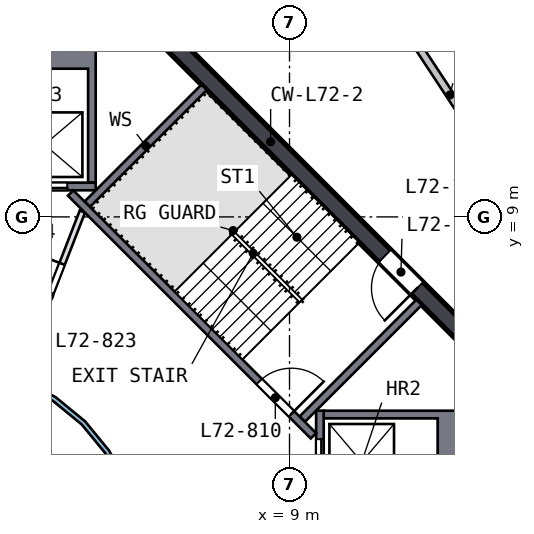
"""IFC4 building model, lengths in metres.
Left out: names, types, materials, properties, quantities, classifications, styles, units other than length and angle.
Written with IfcOpenShell. Run it as: python <this file> out.ifc"""

import sys

from ifc_helpers import new_model, si_unit, direction, frame, frame_2d, origin, place, context, subcontext, project, spatial, polyline, rectangle, outline, extrude, element, fill, save


model = new_model("IFC4")
c1 = context("Model", 3, precision=1e-05, world=origin(), true_north=direction((0.0, 1.0)))
c2 = subcontext(c1, "Body", "Model", "MODEL_VIEW")
j1 = project(units=[si_unit("LENGTHUNIT", "METRE"), si_unit("PLANEANGLEUNIT", "RADIAN")], contexts=[c1])
p1 = place(None, origin())
s1 = spatial("IfcSite", under=j1, at=p1, CompositionType="ELEMENT")
p2 = place(p1, origin())
s2 = spatial("IfcBuilding", under=s1, at=p2, CompositionType="ELEMENT")
p3 = place(p2, frame((0.0, 0.0, 291.5)))
s3 = spatial("IfcBuildingStorey", under=s2, at=p3, CompositionType="ELEMENT", Elevation=291.5)
p4 = place(p3, frame((13.841, 5.64, 0.0), z_axis=(0.0, 0.0, 1.0), x_axis=(-0.707106781, 0.707106781, 0.0)))
e1 = element("IfcWall", 1, at=p4, inside=s3, PredefinedType="SHEAR", context=c2, shape_type="SweptSolid", body=[
    extrude(rectangle(XDim=11.598, YDim=0.45, at=frame_2d((5.799, 0.0))), origin(), (0.0, 0.0, 1.0), 3.5),
])
p5 = place(p4, frame((2.099, 0.0, 0.0)))
e2 = element("IfcOpeningElement", 2, at=p5, cuts=e1, PredefinedType="OPENING", context=c2, shape_type="SweptSolid", body=[
    extrude(rectangle(XDim=1.2, YDim=2.1, at=frame_2d((0.6, 1.05))), frame((0.0, 0.235, 0.0), z_axis=(0.0, -1.0, 0.0), x_axis=(1.0, 0.0, 0.0)), (0.0, 0.0, 1.0), 0.47),
])
p6 = place(p3, origin())
e3 = element("IfcWall", 3, at=p6, inside=s3, PredefinedType="SOLIDWALL", context=c2, shape_type="SweptSolid", body=[
    extrude(outline(polyline([(13.55, 3.9), (13.55, 1.2), (9.9, 1.2), (9.9, 1.4), (12.9, 1.4), (12.9, 3.7), (9.9, 3.7), (9.9, 3.9), (13.55, 3.9)])), origin(), (0.0, 0.0, 1.0), 3.19),
])
p7 = place(p3, frame((9.8, 1.2, 0.0), z_axis=(0.0, 0.0, 1.0), x_axis=(0.0, 1.0, 0.0)))
e4 = element("IfcWall", 4, at=p7, inside=s3, PredefinedType="SOLIDWALL", context=c2, shape_type="SweptSolid", body=[
    extrude(rectangle(XDim=2.7, YDim=0.2, at=frame_2d((1.35, 0.0))), origin(), (0.0, 0.0, 1.0), 3.19),
])
p8 = place(p7, frame((0.75, 0.0, 0.0)))
e5 = element("IfcOpeningElement", 5, at=p8, cuts=e4, PredefinedType="OPENING", context=c2, shape_type="SweptSolid", body=[
    extrude(rectangle(XDim=1.2, YDim=2.1, at=frame_2d((0.6, 1.05))), frame((0.0, 0.11, 0.0), z_axis=(0.0, -1.0, 0.0), x_axis=(1.0, 0.0, 0.0)), (0.0, 0.0, 1.0), 0.22),
])
p9 = place(p3, origin())
e6 = element("IfcWall", 6, at=p9, inside=s3, PredefinedType="SOLIDWALL", context=c2, shape_type="SweptSolid", body=[
    extrude(outline(polyline([(3.9, 9.9), (3.7, 9.9), (3.7, 12.9), (1.4, 12.9), (1.4, 9.9), (1.2, 9.9), (1.2, 13.55), (3.9, 13.55), (3.9, 9.9)])), origin(), (0.0, 0.0, 1.0), 3.19),
])
p10 = place(p3, frame((1.2, 9.8, 0.0), z_axis=(0.0, 0.0, 1.0), x_axis=(1.0, 0.0, 0.0)))
e7 = element("IfcWall", 7, at=p10, inside=s3, PredefinedType="SOLIDWALL", context=c2, shape_type="SweptSolid", body=[
    extrude(rectangle(XDim=2.7, YDim=0.2, at=frame_2d((1.35, 0.0))), origin(), (0.0, 0.0, 1.0), 3.19),
])
p11 = place(p10, frame((0.75, 0.0, 0.0)))
e8 = element("IfcOpeningElement", 8, at=p11, cuts=e7, PredefinedType="OPENING", context=c2, shape_type="SweptSolid", body=[
    extrude(rectangle(XDim=1.2, YDim=2.1, at=frame_2d((0.6, 1.05))), frame((0.0, 0.11, 0.0), z_axis=(0.0, -1.0, 0.0), x_axis=(1.0, 0.0, 0.0)), (0.0, 0.0, 1.0), 0.22),
])
p12 = place(p3, frame((3.24, 9.629, 0.0), z_axis=(0.0, 0.0, 1.0), x_axis=(0.707106781, -0.707106781, 0.0)))
e9 = element("IfcWall", 9, at=p12, inside=s3, PredefinedType="SOLIDWALL", context=c2, shape_type="SweptSolid", body=[
    extrude(rectangle(XDim=9.036, YDim=0.2, at=frame_2d((4.518, 0.0))), origin(), (0.0, 0.0, 1.0), 3.19),
])
p13 = place(p12, frame((7.018, 0.0, 0.0)))
e10 = element("IfcOpeningElement", 10, at=p13, cuts=e9, PredefinedType="OPENING", context=c2, shape_type="SweptSolid", body=[
    extrude(rectangle(XDim=1.2, YDim=2.1, at=frame_2d((0.6, 1.05))), frame((0.0, 0.11, 0.0), z_axis=(0.0, -1.0, 0.0), x_axis=(1.0, 0.0, 0.0)), (0.0, 0.0, 1.0), 0.22),
])
for number, where, z_axis, x_axis in (
    (11, (9.334, 3.677, 0.0), (0.0, 0.0, 1.0), (0.707, 0.707, 0.0)),
    (12, (3.677, 9.334, 0.0), (0.0, 0.0, 1.0), (0.707, 0.707, 0.0)),
):
    element("IfcWall", number, at=place(p3, frame(where, z_axis=z_axis, x_axis=x_axis)), inside=s3, PredefinedType="SOLIDWALL", context=c2, shape_type="SweptSolid", body=[
        extrude(rectangle(XDim=4.35, YDim=0.2, at=frame_2d((2.175, 0.0))), origin(), (0.0, 0.0, 1.0), 3.19),
    ])
p14 = place(p3, frame((1.857, 4.782, 0.0), z_axis=(0.0, 0.0, 1.0), x_axis=(0.36202798, 0.932167228, 0.0)))
e13 = element("IfcWall", 13, at=p14, inside=s3, PredefinedType="PARTITIONING", context=c2, shape_type="SweptSolid", body=[
    extrude(rectangle(XDim=4.676, YDim=0.15, at=frame_2d((2.338, 0.0))), origin(), (0.0, 0.0, 1.0), 3.19),
])
p15 = place(p14, frame((1.4, 0.0, 0.0)))
e14 = element("IfcOpeningElement", 14, at=p15, cuts=e13, PredefinedType="OPENING", context=c2, shape_type="SweptSolid", body=[
    extrude(rectangle(XDim=1.8, YDim=2.1, at=frame_2d((0.9, 1.05))), frame((0.0, 0.085, 0.0), z_axis=(0.0, -1.0, 0.0), x_axis=(1.0, 0.0, 0.0)), (0.0, 0.0, 1.0), 0.17),
])
p16 = place(p3, origin())
e15 = element("IfcWall", 15, at=p16, inside=s3, PredefinedType="SOLIDWALL", context=c2, shape_type="SweptSolid", body=[
    extrude(outline(polyline([(5.021, -0.999), (4.73, -1.959), (4.257, -2.844), (3.62, -3.62), (2.844, -4.257), (1.959, -4.73), (0.999, -5.021), (0.0, -5.12), (-0.999, -5.021), (-1.959, -4.73), (-2.844, -4.257), (-3.62, -3.62), (-4.257, -2.844), (-4.73, -1.959), (-5.021, -0.999), (-5.12, 0.0), (-5.021, 0.999), (-4.73, 1.959), (-4.257, 2.844), (-3.62, 3.62), (-2.844, 4.257), (-1.959, 4.73), (-0.999, 5.021), (0.0, 5.12), (0.999, 5.021), (1.959, 4.73), (2.844, 4.257), (3.62, 3.62), (4.257, 2.844), (4.73, 1.959), (5.021, 0.999), (5.12, 0.0), (5.021, -0.999)]), holes=[polyline([(4.904, 0.976), (4.619, 1.913), (4.157, 2.778), (3.535, 3.535), (2.778, 4.157), (1.913, 4.619), (0.976, 4.904), (0.0, 5.0), (-0.976, 4.904), (-1.913, 4.619), (-2.778, 4.157), (-3.535, 3.535), (-4.157, 2.778), (-4.619, 1.913), (-4.904, 0.976), (-5.0, 0.0), (-4.904, -0.976), (-4.619, -1.913), (-4.157, -2.778), (-3.535, -3.535), (-2.778, -4.157), (-1.913, -4.619), (-0.976, -4.904), (0.0, -5.0), (0.976, -4.904), (1.913, -4.619), (2.778, -4.157), (3.535, -3.535), (4.157, -2.778), (4.619, -1.913), (4.904, -0.976), (5.0, 0.0), (4.904, 0.976)])]), origin(), (0.0, 0.0, 1.0), 3.19),
])
p17 = place(p3, frame((12.216, 13.74, 0.0), z_axis=(0.0, 0.0, 1.0), x_axis=(0.549889366, -0.835237502, 0.0)))
e16 = element("IfcWall", 16, at=p17, inside=s3, PredefinedType="SOLIDWALL", context=c2, shape_type="SweptSolid", body=[
    extrude(rectangle(XDim=9.316, YDim=0.2, at=frame_2d((4.658, 0.0))), origin(), (0.0, 0.0, 1.0), 3.19),
])
p18 = place(p17, frame((3.863, 0.0, 0.0)))
e17 = element("IfcOpeningElement", 17, at=p18, cuts=e16, PredefinedType="OPENING", context=c2, shape_type="SweptSolid", body=[
    extrude(rectangle(XDim=1.8, YDim=2.1, at=frame_2d((0.9, 1.05))), frame((0.0, 0.11, 0.0), z_axis=(0.0, -1.0, 0.0), x_axis=(1.0, 0.0, 0.0)), (0.0, 0.0, 1.0), 0.22),
])
p19 = place(p8, origin())
e18 = element("IfcDoor", 18, at=p19, inside=s3, OperationType="DOUBLE_DOOR_SLIDING", PredefinedType="DOOR", context=c2, shape_type="SweptSolid", body=[
    extrude(rectangle(XDim=1.2, YDim=2.1, at=frame_2d((0.6, 1.05))), frame((0.0, 0.025, 0.0), z_axis=(0.0, -1.0, 0.0), x_axis=(1.0, 0.0, 0.0)), (0.0, 0.0, 1.0), 0.05),
])
fill(e5, e18)
p20 = place(p11, origin())
e19 = element("IfcDoor", 19, at=p20, inside=s3, OperationType="DOUBLE_DOOR_SLIDING", PredefinedType="DOOR", context=c2, shape_type="SweptSolid", body=[
    extrude(rectangle(XDim=1.2, YDim=2.1, at=frame_2d((0.6, 1.05))), frame((0.0, 0.025, 0.0), z_axis=(0.0, -1.0, 0.0), x_axis=(1.0, 0.0, 0.0)), (0.0, 0.0, 1.0), 0.05),
])
fill(e8, e19)
p21 = place(p13, origin())
e20 = element("IfcDoor", 20, at=p21, inside=s3, OperationType="SINGLE_SWING_RIGHT", PredefinedType="DOOR", context=c2, shape_type="SweptSolid", body=[
    extrude(rectangle(XDim=1.2, YDim=2.1, at=frame_2d((0.6, 1.05))), frame((0.0, 0.025, 0.0), z_axis=(0.0, -1.0, 0.0), x_axis=(1.0, 0.0, 0.0)), (0.0, 0.0, 1.0), 0.05),
])
fill(e10, e20)
p22 = place(p5, origin())
e21 = element("IfcDoor", 21, at=p22, inside=s3, OperationType="SINGLE_SWING_LEFT", PredefinedType="DOOR", context=c2, shape_type="SweptSolid", body=[
    extrude(rectangle(XDim=1.2, YDim=2.1, at=frame_2d((0.6, 1.05))), frame((0.0, 0.025, 0.0), z_axis=(0.0, -1.0, 0.0), x_axis=(1.0, 0.0, 0.0)), (0.0, 0.0, 1.0), 0.05),
])
fill(e2, e21)
p23 = place(p15, origin())
e22 = element("IfcDoor", 22, at=p23, inside=s3, OperationType="DOUBLE_DOOR_SINGLE_SWING", PredefinedType="DOOR", context=c2, shape_type="SweptSolid", body=[
    extrude(rectangle(XDim=1.8, YDim=2.1, at=frame_2d((0.9, 1.05))), frame((0.0, 0.025, 0.0), z_axis=(0.0, -1.0, 0.0), x_axis=(1.0, 0.0, 0.0)), (0.0, 0.0, 1.0), 0.05),
])
fill(e14, e22)
save(model, sys.argv[1])
